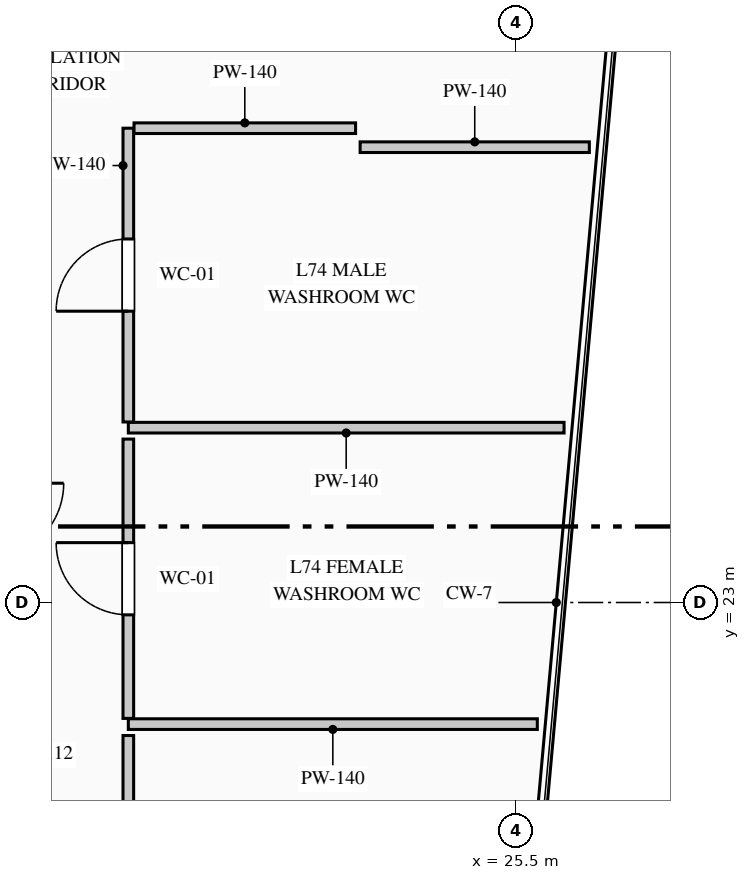
"""IFC4 building model, lengths in metres.
Left out: names, types, materials, properties, quantities, classifications, styles, units other than length and angle.
Written with IfcOpenShell. Run it as: python <this file> out.ifc"""

import sys

from ifc_helpers import new_model, si_unit, direction, frame, frame_2d, origin, place, context, subcontext, project, spatial, rectangle, extrude, element, fill, save


model = new_model("IFC4")
c1 = context("Model", 3, precision=1e-05, world=origin(), true_north=direction((0.0, 1.0)))
c2 = subcontext(c1, "Body", "Model", "MODEL_VIEW")
j1 = project(units=[si_unit("LENGTHUNIT", "METRE"), si_unit("PLANEANGLEUNIT", "RADIAN")], contexts=[c1])
p1 = place(None, origin())
s1 = spatial("IfcSite", under=j1, at=p1, CompositionType="ELEMENT")
p2 = place(p1, origin())
s2 = spatial("IfcBuilding", under=s1, at=p2, CompositionType="ELEMENT")
p3 = place(p2, frame((0.0, 0.0, 308.05)))
s3 = spatial("IfcBuildingStorey", under=s2, at=p3, CompositionType="ELEMENT", Elevation=308.05)
p4 = place(p3, frame((23.45, 28.99, 0.0), z_axis=(0.0, 0.0, 1.0), x_axis=(1.0, 0.0, 0.0)))
e1 = element("IfcWall", 1, at=p4, inside=s3, PredefinedType="PARTITIONING", context=c2, shape_type="SweptSolid", body=[
    extrude(rectangle(XDim=3.016, YDim=0.14, at=frame_2d((1.508, 0.0))), origin(), (0.0, 0.0, 1.0), 3.7),
])
p5 = place(p3, frame((26.133, 25.3, 0.0), z_axis=(0.0, 0.0, 1.0), x_axis=(-1.0, 0.0, 0.0)))
e2 = element("IfcWall", 2, at=p5, inside=s3, PredefinedType="PARTITIONING", context=c2, shape_type="SweptSolid", body=[
    extrude(rectangle(XDim=5.733, YDim=0.14, at=frame_2d((2.866, 0.0))), origin(), (0.0, 0.0, 1.0), 3.7),
])
p6 = place(p3, frame((20.4, 25.375, 0.0), z_axis=(0.0, 0.0, 1.0), x_axis=(0.0, 1.0, 0.0)))
e3 = element("IfcWall", 3, at=p6, inside=s3, PredefinedType="PARTITIONING", context=c2, shape_type="SweptSolid", body=[
    extrude(rectangle(XDim=3.865, YDim=0.14, at=frame_2d((1.933, 0.0))), origin(), (0.0, 0.0, 1.0), 3.7),
])
p7 = place(p6, frame((1.458, 0.0, 0.0)))
e4 = element("IfcOpeningElement", 4, at=p7, cuts=e3, PredefinedType="OPENING", context=c2, shape_type="SweptSolid", body=[
    extrude(rectangle(XDim=0.95, YDim=2.15, at=frame_2d((0.475, 1.075))), frame((0.0, 0.08, 0.0), z_axis=(0.0, -1.0, 0.0), x_axis=(1.0, 0.0, 0.0)), (0.0, 0.0, 1.0), 0.16),
])
p8 = place(p3, frame((20.475, 29.24, 0.0), z_axis=(0.0, 0.0, 1.0), x_axis=(1.0, 0.0, 0.0)))
e5 = element("IfcWall", 5, at=p8, inside=s3, PredefinedType="PARTITIONING", context=c2, shape_type="SweptSolid", body=[
    extrude(rectangle(XDim=2.915, YDim=0.14, at=frame_2d((1.458, 0.0))), origin(), (0.0, 0.0, 1.0), 3.7),
])
p9 = place(p3, frame((25.781, 21.4, 0.0), z_axis=(0.0, 0.0, 1.0), x_axis=(-1.0, 0.0, 0.0)))
e6 = element("IfcWall", 6, at=p9, inside=s3, PredefinedType="PARTITIONING", context=c2, shape_type="SweptSolid", body=[
    extrude(rectangle(XDim=5.381, YDim=0.14, at=frame_2d((2.69, 0.0))), origin(), (0.0, 0.0, 1.0), 3.7),
])
p10 = place(p3, frame((20.4, 21.475, 0.0), z_axis=(0.0, 0.0, 1.0), x_axis=(0.0, 1.0, 0.0)))
e7 = element("IfcWall", 7, at=p10, inside=s3, PredefinedType="PARTITIONING", context=c2, shape_type="SweptSolid", body=[
    extrude(rectangle(XDim=3.675, YDim=0.14, at=frame_2d((1.837, 0.0))), origin(), (0.0, 0.0, 1.0), 3.7),
])
p11 = place(p10, frame((1.363, 0.0, 0.0)))
e8 = element("IfcOpeningElement", 8, at=p11, cuts=e7, PredefinedType="OPENING", context=c2, shape_type="SweptSolid", body=[
    extrude(rectangle(XDim=0.95, YDim=2.15, at=frame_2d((0.475, 1.075))), frame((0.0, 0.08, 0.0), z_axis=(0.0, -1.0, 0.0), x_axis=(1.0, 0.0, 0.0)), (0.0, 0.0, 1.0), 0.16),
])
p12 = place(p3, frame((20.4, 17.255, 0.0), z_axis=(0.0, 0.0, 1.0), x_axis=(0.0, 1.0, 0.0)))
e9 = element("IfcWall", 9, at=p12, inside=s3, PredefinedType="PARTITIONING", context=c2, shape_type="SweptSolid", body=[
    extrude(rectangle(XDim=3.995, YDim=0.14, at=frame_2d((1.998, 0.0))), origin(), (0.0, 0.0, 1.0), 3.7),
])
p13 = place(p12, frame((1.522, 0.0, 0.0)))
e10 = element("IfcOpeningElement", 10, at=p13, cuts=e9, PredefinedType="OPENING", context=c2, shape_type="SweptSolid", body=[
    extrude(rectangle(XDim=0.95, YDim=2.15, at=frame_2d((0.475, 1.075))), frame((0.0, 0.08, 0.0), z_axis=(0.0, -1.0, 0.0), x_axis=(1.0, 0.0, 0.0)), (0.0, 0.0, 1.0), 0.16),
])
p14 = place(p7, origin())
e11 = element("IfcDoor", 11, at=p14, inside=s3, OperationType="SINGLE_SWING_LEFT", PredefinedType="DOOR", context=c2, shape_type="SweptSolid", body=[
    extrude(rectangle(XDim=0.95, YDim=2.15, at=frame_2d((0.475, 1.075))), frame((0.0, 0.025, 0.0), z_axis=(0.0, -1.0, 0.0), x_axis=(1.0, 0.0, 0.0)), (0.0, 0.0, 1.0), 0.05),
])
fill(e4, e11)
p15 = place(p11, origin())
e12 = element("IfcDoor", 12, at=p15, inside=s3, OperationType="SINGLE_SWING_RIGHT", PredefinedType="DOOR", context=c2, shape_type="SweptSolid", body=[
    extrude(rectangle(XDim=0.95, YDim=2.15, at=frame_2d((0.475, 1.075))), frame((0.0, 0.025, 0.0), z_axis=(0.0, -1.0, 0.0), x_axis=(1.0, 0.0, 0.0)), (0.0, 0.0, 1.0), 0.05),
])
fill(e8, e12)
save(model, sys.argv[1])
